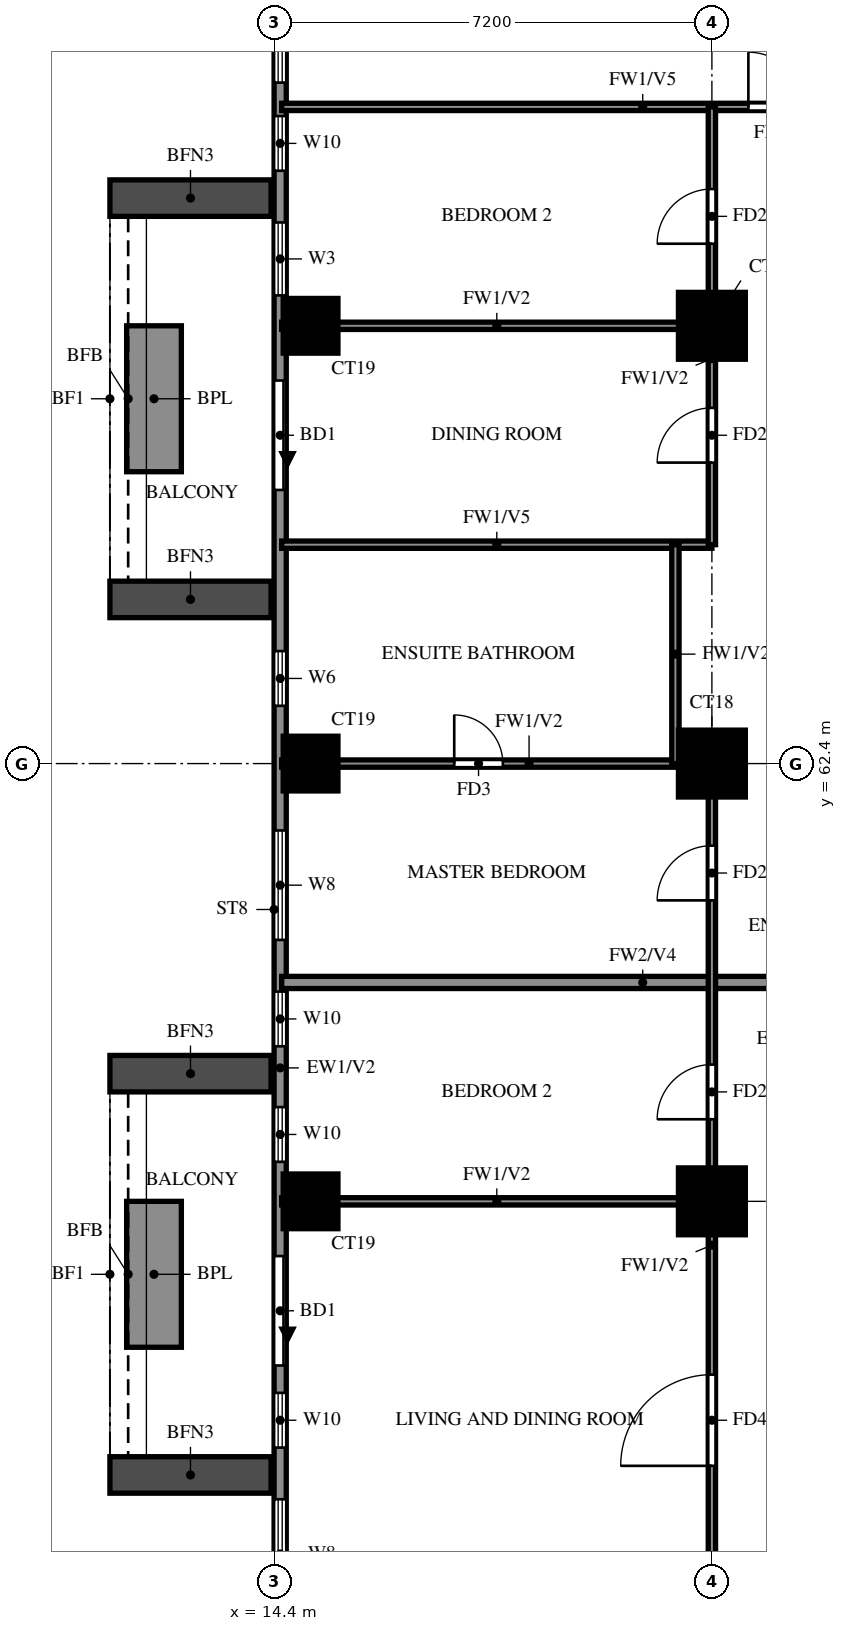
"""IFC4 building model, lengths in metres.
Left out: names, types, materials, properties, quantities, classifications, styles, units other than length and angle.
Written with IfcOpenShell. Run it as: python <this file> out.ifc"""

import sys

from ifc_helpers import new_model, si_unit, direction, frame, frame_2d, origin, origin_2d, place, context, subcontext, project, spatial, rectangle, extrude, source, transform, mapped, element, fill, save


model = new_model("IFC4")
c1 = context("Model", 3, precision=1e-05, world=origin(), true_north=direction((0.0, 1.0)))
c2 = subcontext(c1, "Body", "Model", "MODEL_VIEW")
j1 = project(units=[si_unit("LENGTHUNIT", "METRE"), si_unit("PLANEANGLEUNIT", "RADIAN")], contexts=[c1])
p1 = place(None, origin())
s1 = spatial("IfcSite", under=j1, at=p1, CompositionType="ELEMENT")
p2 = place(p1, origin())
s2 = spatial("IfcBuilding", under=s1, at=p2, CompositionType="ELEMENT")
p3 = place(p2, frame((0.0, 0.0, 127.0)))
s3 = spatial("IfcBuildingStorey", under=s2, at=p3, CompositionType="ELEMENT", Elevation=127.0)
m1 = source(origin(), c2, "Body", "SweptSolid", [
    extrude(rectangle(XDim=0.9, YDim=0.9, at=origin_2d()), origin(), (0.0, 0.0, 1.0), 3.2),
])
p4 = place(p3, frame((15.0, 55.2, 0.0), z_axis=(0.0, 0.0, 1.0), x_axis=(1.0, 0.0, 0.0)))
e1 = element("IfcColumn", 1, at=p4, inside=s3, PredefinedType="COLUMN", context=c2, shape_type="MappedRepresentation", body=[
    mapped(m1, transform((0.0, 0.0, 0.0))),
])
m2 = source(origin(), c2, "Body", "SweptSolid", [
    extrude(rectangle(XDim=1.1, YDim=1.1, at=origin_2d()), origin(), (0.0, 0.0, 1.0), 3.2),
])
p5 = place(p3, frame((21.6, 55.2, 0.0), z_axis=(0.0, 0.0, 1.0), x_axis=(1.0, 0.0, 0.0)))
e2 = element("IfcColumn", 2, at=p5, inside=s3, PredefinedType="COLUMN", context=c2, shape_type="MappedRepresentation", body=[
    mapped(m2, transform((0.0, 0.0, 0.0))),
])
p6 = place(p3, frame((15.0, 62.4, 0.0), z_axis=(0.0, 0.0, 1.0), x_axis=(1.0, 0.0, 0.0)))
e3 = element("IfcColumn", 3, at=p6, inside=s3, PredefinedType="COLUMN", context=c2, shape_type="MappedRepresentation", body=[
    mapped(m1, transform((0.0, 0.0, 0.0))),
])
p7 = place(p3, frame((21.6, 62.4, 0.0), z_axis=(0.0, 0.0, 1.0), x_axis=(1.0, 0.0, 0.0)))
e4 = element("IfcColumn", 4, at=p7, inside=s3, PredefinedType="COLUMN", context=c2, shape_type="MappedRepresentation", body=[
    mapped(m2, transform((0.0, 0.0, 0.0))),
])
p8 = place(p3, frame((15.0, 69.6, 0.0), z_axis=(0.0, 0.0, 1.0), x_axis=(1.0, 0.0, 0.0)))
e5 = element("IfcColumn", 5, at=p8, inside=s3, PredefinedType="COLUMN", context=c2, shape_type="MappedRepresentation", body=[
    mapped(m1, transform((0.0, 0.0, 0.0))),
])
p9 = place(p3, frame((21.6, 69.6, 0.0), z_axis=(0.0, 0.0, 1.0), x_axis=(1.0, 0.0, 0.0)))
e6 = element("IfcColumn", 6, at=p9, inside=s3, PredefinedType="COLUMN", context=c2, shape_type="MappedRepresentation", body=[
    mapped(m2, transform((0.0, 0.0, 0.0))),
])
p10 = place(p3, frame((14.5, 76.6, 0.0), z_axis=(0.0, 0.0, 1.0), x_axis=(0.0, -1.0, 0.0)))
e7 = element("IfcWall", 7, at=p10, inside=s3, PredefinedType="SOLIDWALL", context=c2, shape_type="SweptSolid", body=[
    extrude(rectangle(XDim=33.4, YDim=0.2, at=frame_2d((16.7, 0.0))), origin(), (0.0, 0.0, 1.0), 3.2),
])
p11 = place(p10, frame((7.9, 0.0, 0.0)))
e8 = element("IfcOpeningElement", 8, at=p11, cuts=e7, PredefinedType="OPENING", context=c2, shape_type="SweptSolid", body=[
    extrude(rectangle(XDim=1.8, YDim=2.4, at=frame_2d((0.9, 1.2))), frame((0.0, 0.11, 0.0), z_axis=(0.0, -1.0, 0.0), x_axis=(1.0, 0.0, 0.0)), (0.0, 0.0, 1.0), 0.22),
])
p12 = place(p10, frame((22.3, 0.0, 0.0)))
e9 = element("IfcOpeningElement", 9, at=p12, cuts=e7, PredefinedType="OPENING", context=c2, shape_type="SweptSolid", body=[
    extrude(rectangle(XDim=1.8, YDim=2.4, at=frame_2d((0.9, 1.2))), frame((0.0, 0.11, 0.0), z_axis=(0.0, -1.0, 0.0), x_axis=(1.0, 0.0, 0.0)), (0.0, 0.0, 1.0), 0.22),
])
p13 = place(p10, frame((29.9, 0.0, 0.6)))
e10 = element("IfcOpeningElement", 10, at=p13, cuts=e7, PredefinedType="OPENING", context=c2, shape_type="SweptSolid", body=[
    extrude(rectangle(XDim=2.4, YDim=2.4, at=frame_2d((1.2, 1.2))), frame((0.0, 0.11, 0.0), z_axis=(0.0, -1.0, 0.0), x_axis=(1.0, 0.0, 0.0)), (0.0, 0.0, 1.0), 0.22),
])
p14 = place(p10, frame((24.55, 0.0, 0.6)))
e11 = element("IfcOpeningElement", 11, at=p14, cuts=e7, PredefinedType="OPENING", context=c2, shape_type="SweptSolid", body=[
    extrude(rectangle(XDim=0.9, YDim=2.4, at=frame_2d((0.45, 1.2))), frame((0.0, 0.11, 0.0), z_axis=(0.0, -1.0, 0.0), x_axis=(1.0, 0.0, 0.0)), (0.0, 0.0, 1.0), 0.22),
])
p15 = place(p10, frame((26.3, 0.0, 0.6)))
e12 = element("IfcOpeningElement", 12, at=p15, cuts=e7, PredefinedType="OPENING", context=c2, shape_type="SweptSolid", body=[
    extrude(rectangle(XDim=1.8, YDim=2.4, at=frame_2d((0.9, 1.2))), frame((0.0, 0.11, 0.0), z_axis=(0.0, -1.0, 0.0), x_axis=(1.0, 0.0, 0.0)), (0.0, 0.0, 1.0), 0.22),
])
p16 = place(p10, frame((17.95, 0.0, 0.6)))
e13 = element("IfcOpeningElement", 13, at=p16, cuts=e7, PredefinedType="OPENING", context=c2, shape_type="SweptSolid", body=[
    extrude(rectangle(XDim=0.9, YDim=2.4, at=frame_2d((0.45, 1.2))), frame((0.0, 0.11, 0.0), z_axis=(0.0, -1.0, 0.0), x_axis=(1.0, 0.0, 0.0)), (0.0, 0.0, 1.0), 0.22),
])
p17 = place(p10, frame((19.85, 0.0, 0.6)))
e14 = element("IfcOpeningElement", 14, at=p17, cuts=e7, PredefinedType="OPENING", context=c2, shape_type="SweptSolid", body=[
    extrude(rectangle(XDim=0.9, YDim=2.4, at=frame_2d((0.45, 1.2))), frame((0.0, 0.11, 0.0), z_axis=(0.0, -1.0, 0.0), x_axis=(1.0, 0.0, 0.0)), (0.0, 0.0, 1.0), 0.22),
])
p18 = place(p10, frame((15.3, 0.0, 0.6)))
e15 = element("IfcOpeningElement", 15, at=p18, cuts=e7, PredefinedType="OPENING", context=c2, shape_type="SweptSolid", body=[
    extrude(rectangle(XDim=1.8, YDim=2.4, at=frame_2d((0.9, 1.2))), frame((0.0, 0.11, 0.0), z_axis=(0.0, -1.0, 0.0), x_axis=(1.0, 0.0, 0.0)), (0.0, 0.0, 1.0), 0.22),
])
p19 = place(p10, frame((12.35, 0.0, 1.5)))
e16 = element("IfcOpeningElement", 16, at=p19, cuts=e7, PredefinedType="OPENING", context=c2, shape_type="SweptSolid", body=[
    extrude(rectangle(XDim=0.9, YDim=0.9, at=frame_2d((0.45, 0.45))), frame((0.0, 0.11, 0.0), z_axis=(0.0, -1.0, 0.0), x_axis=(1.0, 0.0, 0.0)), (0.0, 0.0, 1.0), 0.22),
])
p20 = place(p10, frame((3.55, 0.0, 0.6)))
e17 = element("IfcOpeningElement", 17, at=p20, cuts=e7, PredefinedType="OPENING", context=c2, shape_type="SweptSolid", body=[
    extrude(rectangle(XDim=0.9, YDim=2.4, at=frame_2d((0.45, 1.2))), frame((0.0, 0.11, 0.0), z_axis=(0.0, -1.0, 0.0), x_axis=(1.0, 0.0, 0.0)), (0.0, 0.0, 1.0), 0.22),
])
p21 = place(p10, frame((5.3, 0.0, 0.6)))
e18 = element("IfcOpeningElement", 18, at=p21, cuts=e7, PredefinedType="OPENING", context=c2, shape_type="SweptSolid", body=[
    extrude(rectangle(XDim=1.2, YDim=2.4, at=frame_2d((0.6, 1.2))), frame((0.0, 0.11, 0.0), z_axis=(0.0, -1.0, 0.0), x_axis=(1.0, 0.0, 0.0)), (0.0, 0.0, 1.0), 0.22),
])
p22 = place(p10, frame((0.6, 0.0, 0.6)))
e19 = element("IfcOpeningElement", 19, at=p22, cuts=e7, PredefinedType="OPENING", context=c2, shape_type="SweptSolid", body=[
    extrude(rectangle(XDim=2.4, YDim=2.4, at=frame_2d((1.2, 1.2))), frame((0.0, 0.11, 0.0), z_axis=(0.0, -1.0, 0.0), x_axis=(1.0, 0.0, 0.0)), (0.0, 0.0, 1.0), 0.22),
])
for number, where, z_axis, x_axis in (
    (20, (14.35, 71.7, 0.0), (0.0, 0.0, 1.0), (-1.0, 0.0, 0.0)),
    (21, (14.35, 65.1, 0.0), (0.0, 0.0, 1.0), (-1.0, 0.0, 0.0)),
):
    element("IfcWall", number, at=place(p3, frame(where, z_axis=z_axis, x_axis=x_axis)), inside=s3, PredefinedType="SOLIDWALL", context=c2, shape_type="SweptSolid", body=[
        extrude(rectangle(XDim=2.65, YDim=0.6, at=frame_2d((1.325, 0.0))), origin(), (0.0, 0.0, 1.0), 2.85),
    ])
p23 = place(p3, frame((12.425, 69.6, 0.0), z_axis=(0.0, 0.0, 1.0), x_axis=(0.0, -1.0, 0.0)))
e22 = element("IfcWall", 22, at=p23, inside=s3, PredefinedType="SOLIDWALL", context=c2, shape_type="SweptSolid", body=[
    extrude(rectangle(XDim=2.4, YDim=0.9, at=frame_2d((1.2, 0.0))), origin(), (0.0, 0.0, 1.0), 0.9),
])
for number, where, z_axis, x_axis in (
    (23, (14.35, 57.3, 0.0), (0.0, 0.0, 1.0), (-1.0, 0.0, 0.0)),
    (24, (14.35, 50.7, 0.0), (0.0, 0.0, 1.0), (-1.0, 0.0, 0.0)),
):
    element("IfcWall", number, at=place(p3, frame(where, z_axis=z_axis, x_axis=x_axis)), inside=s3, PredefinedType="SOLIDWALL", context=c2, shape_type="SweptSolid", body=[
        extrude(rectangle(XDim=2.65, YDim=0.6, at=frame_2d((1.325, 0.0))), origin(), (0.0, 0.0, 1.0), 2.85),
    ])
p24 = place(p3, frame((12.425, 55.2, 0.0), z_axis=(0.0, 0.0, 1.0), x_axis=(0.0, -1.0, 0.0)))
e25 = element("IfcWall", 25, at=p24, inside=s3, PredefinedType="SOLIDWALL", context=c2, shape_type="SweptSolid", body=[
    extrude(rectangle(XDim=2.4, YDim=0.9, at=frame_2d((1.2, 0.0))), origin(), (0.0, 0.0, 1.0), 0.9),
])
p25 = place(p3, frame((14.525, 58.8, 0.0), z_axis=(0.0, 0.0, 1.0), x_axis=(1.0, 0.0, 0.0)))
e26 = element("IfcWall", 26, at=p25, inside=s3, PredefinedType="SOLIDWALL", context=c2, shape_type="SweptSolid", body=[
    extrude(rectangle(XDim=11.875, YDim=0.2, at=frame_2d((5.938, 0.0))), origin(), (0.0, 0.0, 1.0), 2.3),
])
p26 = place(p3, frame((14.525, 55.2, 0.0), z_axis=(0.0, 0.0, 1.0), x_axis=(1.0, 0.0, 0.0)))
e27 = element("IfcWall", 27, at=p26, inside=s3, PredefinedType="PARTITIONING", context=c2, shape_type="SweptSolid", body=[
    extrude(rectangle(XDim=7.075, YDim=0.12, at=frame_2d((3.538, 0.0))), origin(), (0.0, 0.0, 1.0), 3.2),
])
p27 = place(p3, frame((14.525, 62.4, 0.0), z_axis=(0.0, 0.0, 1.0), x_axis=(1.0, 0.0, 0.0)))
e28 = element("IfcWall", 28, at=p27, inside=s3, PredefinedType="PARTITIONING", context=c2, shape_type="SweptSolid", body=[
    extrude(rectangle(XDim=7.075, YDim=0.12, at=frame_2d((3.538, 0.0))), origin(), (0.0, 0.0, 1.0), 3.2),
])
p28 = place(p27, frame((2.837, 0.0, 0.0)))
e29 = element("IfcOpeningElement", 29, at=p28, cuts=e28, PredefinedType="OPENING", context=c2, shape_type="SweptSolid", body=[
    extrude(rectangle(XDim=0.8, YDim=2.1, at=frame_2d((0.4, 1.05))), frame((0.0, 0.07, 0.0), z_axis=(0.0, -1.0, 0.0), x_axis=(1.0, 0.0, 0.0)), (0.0, 0.0, 1.0), 0.14),
])
p29 = place(p3, frame((14.525, 66.0, 0.0), z_axis=(0.0, 0.0, 1.0), x_axis=(1.0, 0.0, 0.0)))
e30 = element("IfcWall", 30, at=p29, inside=s3, PredefinedType="PARTITIONING", context=c2, shape_type="SweptSolid", body=[
    extrude(rectangle(XDim=7.075, YDim=0.12, at=frame_2d((3.538, 0.0))), origin(), (0.0, 0.0, 1.0), 2.3),
])
p30 = place(p3, frame((14.525, 69.6, 0.0), z_axis=(0.0, 0.0, 1.0), x_axis=(1.0, 0.0, 0.0)))
e31 = element("IfcWall", 31, at=p30, inside=s3, PredefinedType="PARTITIONING", context=c2, shape_type="SweptSolid", body=[
    extrude(rectangle(XDim=7.075, YDim=0.12, at=frame_2d((3.538, 0.0))), origin(), (0.0, 0.0, 1.0), 3.2),
])
p31 = place(p3, frame((14.525, 73.2, 0.0), z_axis=(0.0, 0.0, 1.0), x_axis=(1.0, 0.0, 0.0)))
e32 = element("IfcWall", 32, at=p31, inside=s3, PredefinedType="PARTITIONING", context=c2, shape_type="SweptSolid", body=[
    extrude(rectangle(XDim=11.875, YDim=0.12, at=frame_2d((5.938, 0.0))), origin(), (0.0, 0.0, 1.0), 2.3),
])
p32 = place(p31, frame((7.675, 0.0, 0.0)))
e33 = element("IfcOpeningElement", 33, at=p32, cuts=e32, PredefinedType="OPENING", context=c2, shape_type="SweptSolid", body=[
    extrude(rectangle(XDim=0.9, YDim=2.1, at=frame_2d((0.45, 1.05))), frame((0.0, 0.07, 0.0), z_axis=(0.0, -1.0, 0.0), x_axis=(1.0, 0.0, 0.0)), (0.0, 0.0, 1.0), 0.14),
])
p33 = place(p3, frame((21.0, 62.4, 0.0), z_axis=(0.0, 0.0, 1.0), x_axis=(0.0, 1.0, 0.0)))
e34 = element("IfcWall", 34, at=p33, inside=s3, PredefinedType="PARTITIONING", context=c2, shape_type="SweptSolid", body=[
    extrude(rectangle(XDim=3.6, YDim=0.12, at=frame_2d((1.8, 0.0))), origin(), (0.0, 0.0, 1.0), 3.2),
])
p34 = place(p3, frame((21.6, 48.0, 0.0), z_axis=(0.0, 0.0, 1.0), x_axis=(0.0, 1.0, 0.0)))
e35 = element("IfcWall", 35, at=p34, inside=s3, PredefinedType="PARTITIONING", context=c2, shape_type="SweptSolid", body=[
    extrude(rectangle(XDim=14.4, YDim=0.12, at=frame_2d((7.2, 0.0))), origin(), (0.0, 0.0, 1.0), 3.2),
])
p35 = place(p34, frame((2.85, 0.0, 0.0)))
e36 = element("IfcOpeningElement", 36, at=p35, cuts=e35, PredefinedType="OPENING", context=c2, shape_type="SweptSolid", body=[
    extrude(rectangle(XDim=1.5, YDim=2.1, at=frame_2d((0.75, 1.05))), frame((0.0, 0.07, 0.0), z_axis=(0.0, -1.0, 0.0), x_axis=(1.0, 0.0, 0.0)), (0.0, 0.0, 1.0), 0.14),
])
p36 = place(p34, frame((8.55, 0.0, 0.0)))
e37 = element("IfcOpeningElement", 37, at=p36, cuts=e35, PredefinedType="OPENING", context=c2, shape_type="SweptSolid", body=[
    extrude(rectangle(XDim=0.9, YDim=2.1, at=frame_2d((0.45, 1.05))), frame((0.0, 0.07, 0.0), z_axis=(0.0, -1.0, 0.0), x_axis=(1.0, 0.0, 0.0)), (0.0, 0.0, 1.0), 0.14),
])
p37 = place(p34, frame((12.15, 0.0, 0.0)))
e38 = element("IfcOpeningElement", 38, at=p37, cuts=e35, PredefinedType="OPENING", context=c2, shape_type="SweptSolid", body=[
    extrude(rectangle(XDim=0.9, YDim=2.1, at=frame_2d((0.45, 1.05))), frame((0.0, 0.07, 0.0), z_axis=(0.0, -1.0, 0.0), x_axis=(1.0, 0.0, 0.0)), (0.0, 0.0, 1.0), 0.14),
])
p38 = place(p3, frame((21.6, 66.0, 0.0), z_axis=(0.0, 0.0, 1.0), x_axis=(0.0, 1.0, 0.0)))
e39 = element("IfcWall", 39, at=p38, inside=s3, PredefinedType="PARTITIONING", context=c2, shape_type="SweptSolid", body=[
    extrude(rectangle(XDim=7.2, YDim=0.12, at=frame_2d((3.6, 0.0))), origin(), (0.0, 0.0, 1.0), 3.2),
])
p39 = place(p38, frame((1.35, 0.0, 0.0)))
e40 = element("IfcOpeningElement", 40, at=p39, cuts=e39, PredefinedType="OPENING", context=c2, shape_type="SweptSolid", body=[
    extrude(rectangle(XDim=0.9, YDim=2.1, at=frame_2d((0.45, 1.05))), frame((0.0, 0.07, 0.0), z_axis=(0.0, -1.0, 0.0), x_axis=(1.0, 0.0, 0.0)), (0.0, 0.0, 1.0), 0.14),
])
p40 = place(p38, frame((4.95, 0.0, 0.0)))
e41 = element("IfcOpeningElement", 41, at=p40, cuts=e39, PredefinedType="OPENING", context=c2, shape_type="SweptSolid", body=[
    extrude(rectangle(XDim=0.9, YDim=2.1, at=frame_2d((0.45, 1.05))), frame((0.0, 0.07, 0.0), z_axis=(0.0, -1.0, 0.0), x_axis=(1.0, 0.0, 0.0)), (0.0, 0.0, 1.0), 0.14),
])
p41 = place(p11, origin())
e42 = element("IfcDoor", 42, at=p41, inside=s3, OperationType="DOUBLE_DOOR_SLIDING", PredefinedType="DOOR", context=c2, shape_type="SweptSolid", body=[
    extrude(rectangle(XDim=1.8, YDim=2.4, at=frame_2d((0.9, 1.2))), frame((0.0, 0.025, 0.0), z_axis=(0.0, -1.0, 0.0), x_axis=(1.0, 0.0, 0.0)), (0.0, 0.0, 1.0), 0.05),
])
fill(e8, e42)
p42 = place(p12, origin())
e43 = element("IfcDoor", 43, at=p42, inside=s3, OperationType="DOUBLE_DOOR_SLIDING", PredefinedType="DOOR", context=c2, shape_type="SweptSolid", body=[
    extrude(rectangle(XDim=1.8, YDim=2.4, at=frame_2d((0.9, 1.2))), frame((0.0, 0.025, 0.0), z_axis=(0.0, -1.0, 0.0), x_axis=(1.0, 0.0, 0.0)), (0.0, 0.0, 1.0), 0.05),
])
fill(e9, e43)
p43 = place(p14, origin())
e44 = element("IfcWindow", 44, at=p43, inside=s3, PartitioningType="SINGLE_PANEL", PredefinedType="WINDOW", context=c2, shape_type="SweptSolid", body=[
    extrude(rectangle(XDim=0.9, YDim=2.4, at=frame_2d((0.45, 1.2))), frame((0.0, 0.03, 0.0), z_axis=(0.0, -1.0, 0.0), x_axis=(1.0, 0.0, 0.0)), (0.0, 0.0, 1.0), 0.06),
])
fill(e11, e44)
p44 = place(p15, origin())
e45 = element("IfcWindow", 45, at=p44, inside=s3, PartitioningType="DOUBLE_PANEL_VERTICAL", PredefinedType="WINDOW", context=c2, shape_type="SweptSolid", body=[
    extrude(rectangle(XDim=1.8, YDim=2.4, at=frame_2d((0.9, 1.2))), frame((0.0, 0.03, 0.0), z_axis=(0.0, -1.0, 0.0), x_axis=(1.0, 0.0, 0.0)), (0.0, 0.0, 1.0), 0.06),
])
fill(e12, e45)
p45 = place(p16, origin())
e46 = element("IfcWindow", 46, at=p45, inside=s3, PartitioningType="SINGLE_PANEL", PredefinedType="WINDOW", context=c2, shape_type="SweptSolid", body=[
    extrude(rectangle(XDim=0.9, YDim=2.4, at=frame_2d((0.45, 1.2))), frame((0.0, 0.03, 0.0), z_axis=(0.0, -1.0, 0.0), x_axis=(1.0, 0.0, 0.0)), (0.0, 0.0, 1.0), 0.06),
])
fill(e13, e46)
p46 = place(p17, origin())
e47 = element("IfcWindow", 47, at=p46, inside=s3, PartitioningType="SINGLE_PANEL", PredefinedType="WINDOW", context=c2, shape_type="SweptSolid", body=[
    extrude(rectangle(XDim=0.9, YDim=2.4, at=frame_2d((0.45, 1.2))), frame((0.0, 0.03, 0.0), z_axis=(0.0, -1.0, 0.0), x_axis=(1.0, 0.0, 0.0)), (0.0, 0.0, 1.0), 0.06),
])
fill(e14, e47)
p47 = place(p18, origin())
e48 = element("IfcWindow", 48, at=p47, inside=s3, PartitioningType="DOUBLE_PANEL_VERTICAL", PredefinedType="WINDOW", context=c2, shape_type="SweptSolid", body=[
    extrude(rectangle(XDim=1.8, YDim=2.4, at=frame_2d((0.9, 1.2))), frame((0.0, 0.03, 0.0), z_axis=(0.0, -1.0, 0.0), x_axis=(1.0, 0.0, 0.0)), (0.0, 0.0, 1.0), 0.06),
])
fill(e15, e48)
p48 = place(p19, origin())
e49 = element("IfcWindow", 49, at=p48, inside=s3, PartitioningType="SINGLE_PANEL", PredefinedType="WINDOW", context=c2, shape_type="SweptSolid", body=[
    extrude(rectangle(XDim=0.9, YDim=0.9, at=frame_2d((0.45, 0.45))), frame((0.0, 0.03, 0.0), z_axis=(0.0, -1.0, 0.0), x_axis=(1.0, 0.0, 0.0)), (0.0, 0.0, 1.0), 0.06),
])
fill(e16, e49)
p49 = place(p20, origin())
e50 = element("IfcWindow", 50, at=p49, inside=s3, PartitioningType="SINGLE_PANEL", PredefinedType="WINDOW", context=c2, shape_type="SweptSolid", body=[
    extrude(rectangle(XDim=0.9, YDim=2.4, at=frame_2d((0.45, 1.2))), frame((0.0, 0.03, 0.0), z_axis=(0.0, -1.0, 0.0), x_axis=(1.0, 0.0, 0.0)), (0.0, 0.0, 1.0), 0.06),
])
fill(e17, e50)
p50 = place(p21, origin())
e51 = element("IfcWindow", 51, at=p50, inside=s3, PartitioningType="SINGLE_PANEL", PredefinedType="WINDOW", context=c2, shape_type="SweptSolid", body=[
    extrude(rectangle(XDim=1.2, YDim=2.4, at=frame_2d((0.6, 1.2))), frame((0.0, 0.03, 0.0), z_axis=(0.0, -1.0, 0.0), x_axis=(1.0, 0.0, 0.0)), (0.0, 0.0, 1.0), 0.06),
])
fill(e18, e51)
p51 = place(p22, origin())
e52 = element("IfcWindow", 52, at=p51, inside=s3, PartitioningType="DOUBLE_PANEL_VERTICAL", PredefinedType="WINDOW", context=c2, shape_type="SweptSolid", body=[
    extrude(rectangle(XDim=2.4, YDim=2.4, at=frame_2d((1.2, 1.2))), frame((0.0, 0.03, 0.0), z_axis=(0.0, -1.0, 0.0), x_axis=(1.0, 0.0, 0.0)), (0.0, 0.0, 1.0), 0.06),
])
fill(e19, e52)
p52 = place(p35, origin())
e53 = element("IfcDoor", 53, at=p52, inside=s3, OperationType="SINGLE_SWING_LEFT", PredefinedType="DOOR", context=c2, shape_type="SweptSolid", body=[
    extrude(rectangle(XDim=1.5, YDim=2.1, at=frame_2d((0.75, 1.05))), frame((0.0, 0.025, 0.0), z_axis=(0.0, -1.0, 0.0), x_axis=(1.0, 0.0, 0.0)), (0.0, 0.0, 1.0), 0.05),
])
fill(e36, e53)
p53 = place(p36, origin())
e54 = element("IfcDoor", 54, at=p53, inside=s3, OperationType="SINGLE_SWING_LEFT", PredefinedType="DOOR", context=c2, shape_type="SweptSolid", body=[
    extrude(rectangle(XDim=0.9, YDim=2.1, at=frame_2d((0.45, 1.05))), frame((0.0, 0.025, 0.0), z_axis=(0.0, -1.0, 0.0), x_axis=(1.0, 0.0, 0.0)), (0.0, 0.0, 1.0), 0.05),
])
fill(e37, e54)
p54 = place(p37, origin())
e55 = element("IfcDoor", 55, at=p54, inside=s3, OperationType="SINGLE_SWING_LEFT", PredefinedType="DOOR", context=c2, shape_type="SweptSolid", body=[
    extrude(rectangle(XDim=0.9, YDim=2.1, at=frame_2d((0.45, 1.05))), frame((0.0, 0.025, 0.0), z_axis=(0.0, -1.0, 0.0), x_axis=(1.0, 0.0, 0.0)), (0.0, 0.0, 1.0), 0.05),
])
fill(e38, e55)
p55 = place(p28, origin())
e56 = element("IfcDoor", 56, at=p55, inside=s3, OperationType="SINGLE_SWING_LEFT", PredefinedType="DOOR", context=c2, shape_type="SweptSolid", body=[
    extrude(rectangle(XDim=0.8, YDim=2.1, at=frame_2d((0.4, 1.05))), frame((0.0, 0.025, 0.0), z_axis=(0.0, -1.0, 0.0), x_axis=(1.0, 0.0, 0.0)), (0.0, 0.0, 1.0), 0.05),
])
fill(e29, e56)
p56 = place(p39, origin())
e57 = element("IfcDoor", 57, at=p56, inside=s3, OperationType="SINGLE_SWING_RIGHT", PredefinedType="DOOR", context=c2, shape_type="SweptSolid", body=[
    extrude(rectangle(XDim=0.9, YDim=2.1, at=frame_2d((0.45, 1.05))), frame((0.0, 0.025, 0.0), z_axis=(0.0, -1.0, 0.0), x_axis=(1.0, 0.0, 0.0)), (0.0, 0.0, 1.0), 0.05),
])
fill(e40, e57)
p57 = place(p40, origin())
e58 = element("IfcDoor", 58, at=p57, inside=s3, OperationType="SINGLE_SWING_LEFT", PredefinedType="DOOR", context=c2, shape_type="SweptSolid", body=[
    extrude(rectangle(XDim=0.9, YDim=2.1, at=frame_2d((0.45, 1.05))), frame((0.0, 0.025, 0.0), z_axis=(0.0, -1.0, 0.0), x_axis=(1.0, 0.0, 0.0)), (0.0, 0.0, 1.0), 0.05),
])
fill(e41, e58)
p58 = place(p32, origin())
e59 = element("IfcDoor", 59, at=p58, inside=s3, OperationType="SINGLE_SWING_LEFT", PredefinedType="DOOR", context=c2, shape_type="SweptSolid", body=[
    extrude(rectangle(XDim=0.9, YDim=2.1, at=frame_2d((0.45, 1.05))), frame((0.0, 0.025, 0.0), z_axis=(0.0, -1.0, 0.0), x_axis=(1.0, 0.0, 0.0)), (0.0, 0.0, 1.0), 0.05),
])
fill(e33, e59)
save(model, sys.argv[1])
